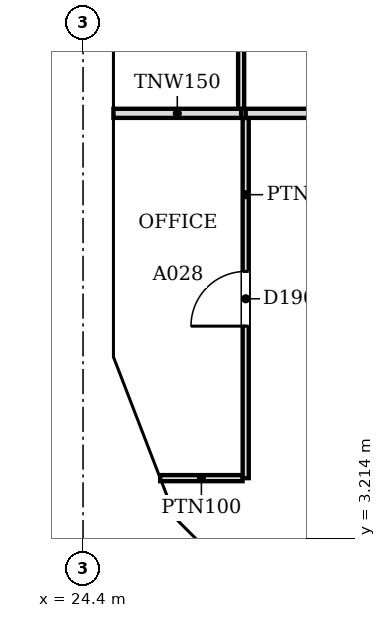
"""IFC4 building model, lengths in metres.
Left out: names, types, materials, properties, quantities, classifications, styles, units other than length and angle.
Written with IfcOpenShell. Run it as: python <this file> out.ifc"""

import sys

from ifc_helpers import new_model, si_unit, direction, frame, frame_2d, origin, place, context, subcontext, project, spatial, polyline, rectangle, outline, extrude, faceted_brep, source, transform, mapped, element, fill, save


model = new_model("IFC4")
c1 = context("Model", 3, precision=1e-05, world=origin(), true_north=direction((0.0, 1.0)))
c2 = subcontext(c1, "Body", "Model", "MODEL_VIEW")
j1 = project(units=[si_unit("LENGTHUNIT", "METRE"), si_unit("PLANEANGLEUNIT", "RADIAN")], contexts=[c1])
p1 = place(None, origin())
s1 = spatial("IfcSite", under=j1, at=p1, CompositionType="ELEMENT")
p2 = place(p1, origin())
s2 = spatial("IfcBuilding", under=s1, at=p2, CompositionType="ELEMENT")
p3 = place(p2, frame((0.0, 0.0, 33.4)))
s3 = spatial("IfcBuildingStorey", under=s2, at=p3, CompositionType="ELEMENT", Elevation=33.4)
m1 = source(origin(), c2, "Body", "Brep", [
    faceted_brep([(3.096, -0.25, 0.0), (6.1, -0.25, 3.8), (3.096, -0.25, 7.6), (0.047, -0.25, 3.857), (0.047, -0.25, 3.743), (0.0, 0.25, 3.8), (3.096, 0.25, 7.6), (6.053, 0.25, 3.859), (6.053, 0.25, 3.741), (3.096, 0.25, 0.0), (6.1, -0.0, 3.8), (0.0, 0.0, 3.8)], [[[0, 1, 2, 3, 4]], [[5, 6, 7, 8, 9]], [[9, 8, 10, 1, 0]], [[7, 6, 2, 1, 10]], [[6, 5, 11, 3, 2]], [[5, 9, 0, 4, 11]], [[11, 4, 3]], [[10, 8, 7]]]),
])
p4 = place(p3, frame((24.65, 12.247, -3.8), z_axis=(0.0, 0.0, 1.0), x_axis=(0.0, -1.0, 0.0)))
e1 = element("IfcWall", 1, at=p4, inside=s3, PredefinedType="SOLIDWALL", context=c2, shape_type="MappedRepresentation", body=[
    mapped(m1, transform((0.0, 0.0, 0.0), scale=1.0)),
])
m2 = source(origin(), c2, "Body", "SweptSolid", [
    extrude(outline(polyline([(3.094, 0.399), (5.781, 3.8), (3.094, 7.2), (0.323, 3.8), (3.094, 0.399)])), frame((0.0, 0.26, 0.0), z_axis=(0.0, -1.0, 0.0), x_axis=(1.0, 0.0, 0.0)), (0.0, 0.0, 1.0), 0.52),
])
p5 = place(p4, origin())
e2 = element("IfcOpeningElement", 2, at=p5, cuts=e1, PredefinedType="OPENING", context=c2, shape_type="MappedRepresentation", body=[
    mapped(m2, transform((0.0, 0.0, 0.0), scale=1.0)),
])
m3 = source(origin(), c2, "Body", "Brep", [
    faceted_brep([(2.95, -0.25, 0.0), (3.003, -0.25, 0.068), (3.003, -0.25, 7.531), (2.95, -0.25, 7.6), (0.0, -0.25, 3.8), (0.047, 0.25, 3.86), (2.898, 0.25, 7.532), (2.898, 0.25, 0.068), (0.047, 0.25, 3.74), (2.95, 0.0, 0.0), (2.95, 0.0, 7.6), (0.0, 0.0, 3.8)], [[[0, 1, 2, 3, 4]], [[5, 6, 7, 8]], [[1, 0, 9]], [[10, 3, 2]], [[6, 5, 11, 4, 3, 10]], [[8, 7, 9, 0, 4, 11]], [[8, 11, 5]], [[1, 9, 7, 6, 10, 2]]]),
])
p6 = place(p3, frame((24.65, 6.146, -3.8), z_axis=(0.0, 0.0, 1.0), x_axis=(0.359953949349, -0.932970071518, 0.0)))
e3 = element("IfcWall", 3, at=p6, inside=s3, PredefinedType="SOLIDWALL", context=c2, shape_type="MappedRepresentation", body=[
    mapped(m3, transform((0.0, 0.0, 0.0), scale=1.0)),
])
m4 = source(origin(), c2, "Body", "SweptSolid", [
    extrude(outline(polyline([(2.75, 6.935), (0.316, 3.8), (2.75, 0.665), (2.75, 6.935)])), frame((0.0, 0.26, 0.0), z_axis=(0.0, -1.0, 0.0), x_axis=(1.0, 0.0, 0.0)), (0.0, 0.0, 1.0), 0.52),
])
p7 = place(p6, origin())
e4 = element("IfcOpeningElement", 4, at=p7, cuts=e3, PredefinedType="OPENING", context=c2, shape_type="MappedRepresentation", body=[
    mapped(m4, transform((0.0, 0.0, 0.0), scale=1.0)),
])
m5 = source(origin(), c2, "Body", "Brep", [
    faceted_brep([(0.053, -0.25, 0.0), (2.997, -0.25, 3.8), (0.053, -0.25, 7.6), (0.0, -0.25, 7.532), (0.0, -0.25, 0.068), (0.106, 0.25, 7.531), (2.944, 0.25, 3.868), (2.944, 0.25, 3.732), (0.106, 0.25, 0.068), (2.997, 0.0, 3.8), (0.053, 0.0, 0.0), (0.053, 0.0, 7.6)], [[[0, 1, 2, 3, 4]], [[5, 6, 7, 8]], [[8, 7, 9, 1, 0, 10]], [[6, 5, 11, 2, 1, 9]], [[3, 2, 11]], [[10, 0, 4]], [[8, 10, 4, 3, 11, 5]], [[9, 7, 6]]]),
])
p8 = place(p3, frame((25.675, 3.431, -3.8), z_axis=(0.0, 0.0, 1.0), x_axis=(0.707106781187, -0.707106781187, 0.0)))
e5 = element("IfcWall", 5, at=p8, inside=s3, PredefinedType="SOLIDWALL", context=c2, shape_type="MappedRepresentation", body=[
    mapped(m5, transform((0.0, 0.0, 0.0), scale=1.0)),
])
m6 = source(origin(), c2, "Body", "SweptSolid", [
    extrude(outline(polyline([(0.253, 0.666), (2.681, 3.8), (0.253, 6.934), (0.253, 0.666)])), frame((0.0, 0.26, 0.0), z_axis=(0.0, -1.0, 0.0), x_axis=(1.0, 0.0, 0.0)), (0.0, 0.0, 1.0), 0.52),
])
p9 = place(p8, origin())
e6 = element("IfcOpeningElement", 6, at=p9, cuts=e5, PredefinedType="OPENING", context=c2, shape_type="MappedRepresentation", body=[
    mapped(m6, transform((0.0, 0.0, 0.0), scale=1.0)),
])
p10 = place(p2, frame((0.0, 0.0, 37.2)))
s4 = spatial("IfcBuildingStorey", under=s2, at=p10, CompositionType="ELEMENT", Elevation=37.2)
m7 = source(origin(), c2, "Body", "Brep", [
    faceted_brep([(0.093, -0.25, 0.057), (3.143, -0.25, 3.8), (0.093, -0.25, 7.543), (0.0, 0.25, 7.544), (0.047, 0.25, 7.6), (3.143, 0.25, 3.8), (0.047, 0.25, 0.0), (0.0, 0.25, 0.056), (0.047, 0.0, 0.0), (0.047, 0.0, 7.6)], [[[0, 1, 2]], [[3, 4, 5, 6, 7]], [[6, 5, 1, 0, 8]], [[5, 4, 9, 2, 1]], [[4, 3, 9]], [[7, 6, 8]], [[7, 8, 0, 2, 9, 3]]]),
])
p11 = place(p10, frame((24.65, 12.293, -3.8), z_axis=(0.0, 0.0, 1.0), x_axis=(0.0, -1.0, 0.0)))
e7 = element("IfcWall", 7, at=p11, inside=s4, PredefinedType="SOLIDWALL", context=c2, shape_type="MappedRepresentation", body=[
    mapped(m7, transform((0.0, 0.0, 0.0), scale=1.0)),
])
m8 = source(origin(), c2, "Body", "SweptSolid", [
    extrude(outline(polyline([(0.247, 0.641), (2.821, 3.8), (0.247, 6.959), (0.247, 0.641)])), frame((0.0, 0.26, 0.0), z_axis=(0.0, -1.0, 0.0), x_axis=(1.0, 0.0, 0.0)), (0.0, 0.0, 1.0), 0.52),
])
p12 = place(p11, origin())
e8 = element("IfcOpeningElement", 8, at=p12, cuts=e7, PredefinedType="OPENING", context=c2, shape_type="MappedRepresentation", body=[
    mapped(m8, transform((0.0, 0.0, 0.0), scale=1.0)),
])
m9 = source(origin(), c2, "Body", "Brep", [
    faceted_brep([(3.003, -0.25, 0.0), (3.05, -0.25, 0.06), (3.05, -0.25, 7.54), (3.003, -0.25, 7.6), (0.0, -0.25, 3.8), (0.0, 0.25, 3.8), (2.957, 0.25, 7.541), (2.957, 0.25, 0.059), (3.003, 0.0, 0.0), (3.003, 0.0, 7.6)], [[[0, 1, 2, 3, 4]], [[5, 6, 7]], [[1, 0, 8]], [[9, 3, 2]], [[6, 5, 4, 3, 9]], [[5, 7, 8, 0, 4]], [[1, 8, 7, 6, 9, 2]]]),
])
p13 = place(p10, frame((24.65, 9.15, -3.8), z_axis=(0.0, 0.0, 1.0), x_axis=(0.0, -1.0, 0.0)))
e9 = element("IfcWall", 9, at=p13, inside=s4, PredefinedType="SOLIDWALL", context=c2, shape_type="MappedRepresentation", body=[
    mapped(m9, transform((0.0, 0.0, 0.0), scale=1.0)),
])
m10 = source(origin(), c2, "Body", "SweptSolid", [
    extrude(outline(polyline([(2.803, 6.944), (0.319, 3.8), (2.803, 0.656), (2.803, 6.944)])), frame((0.0, 0.26, 0.0), z_axis=(0.0, -1.0, 0.0), x_axis=(1.0, 0.0, 0.0)), (0.0, 0.0, 1.0), 0.52),
])
p14 = place(p13, origin())
e10 = element("IfcOpeningElement", 10, at=p14, cuts=e9, PredefinedType="OPENING", context=c2, shape_type="MappedRepresentation", body=[
    mapped(m10, transform((0.0, 0.0, 0.0), scale=1.0)),
])
m11 = source(origin(), c2, "Body", "Brep", [
    faceted_brep([(0.047, -0.25, 0.0), (2.997, -0.25, 3.8), (0.047, -0.25, 7.6), (0.0, -0.25, 7.541), (0.0, -0.25, 0.059), (0.093, 0.25, 7.54), (2.944, 0.25, 3.868), (2.944, 0.25, 3.732), (0.093, 0.25, 0.06), (2.997, 0.0, 3.8), (0.047, 0.0, 0.0), (0.047, 0.0, 7.6)], [[[0, 1, 2, 3, 4]], [[5, 6, 7, 8]], [[8, 7, 9, 1, 0, 10]], [[6, 5, 11, 2, 1, 9]], [[3, 2, 11]], [[10, 0, 4]], [[8, 10, 4, 3, 11, 5]], [[9, 7, 6]]]),
])
p15 = place(p10, frame((24.633, 6.19, -3.8), z_axis=(0.0, 0.0, 1.0), x_axis=(0.359901446078, -0.932990326376, 0.0)))
e11 = element("IfcWall", 11, at=p15, inside=s4, PredefinedType="SOLIDWALL", context=c2, shape_type="MappedRepresentation", body=[
    mapped(m11, transform((0.0, 0.0, 0.0), scale=1.0)),
])
m12 = source(origin(), c2, "Body", "SweptSolid", [
    extrude(outline(polyline([(0.247, 0.665), (2.681, 3.8), (0.247, 6.935), (0.247, 0.665)])), frame((0.0, 0.26, 0.0), z_axis=(0.0, -1.0, 0.0), x_axis=(1.0, 0.0, 0.0)), (0.0, 0.0, 1.0), 0.52),
])
p16 = place(p15, origin())
e12 = element("IfcOpeningElement", 12, at=p16, cuts=e11, PredefinedType="OPENING", context=c2, shape_type="MappedRepresentation", body=[
    mapped(m12, transform((0.0, 0.0, 0.0), scale=1.0)),
])
m13 = source(origin(), c2, "Body", "Brep", [
    faceted_brep([(2.944, -0.25, 0.0), (2.997, -0.25, 0.068), (2.997, -0.25, 7.532), (2.944, -0.25, 7.6), (0.0, -0.25, 3.8), (0.053, 0.25, 3.868), (2.891, 0.25, 7.532), (2.891, 0.25, 0.068), (0.053, 0.25, 3.732), (2.944, 0.0, 0.0), (2.944, 0.0, 7.6), (0.0, 0.0, 3.8)], [[[0, 1, 2, 3, 4]], [[5, 6, 7, 8]], [[1, 0, 9]], [[10, 3, 2]], [[6, 5, 11, 4, 3, 10]], [[8, 7, 9, 0, 4, 11]], [[8, 11, 5]], [[1, 9, 7, 6, 10, 2]]]),
])
p17 = place(p10, frame((25.712, 3.394, -3.8), z_axis=(0.0, 0.0, 1.0), x_axis=(0.707066050402, -0.707147509625, 0.0)))
e13 = element("IfcWall", 13, at=p17, inside=s4, PredefinedType="SOLIDWALL", context=c2, shape_type="MappedRepresentation", body=[
    mapped(m13, transform((0.0, 0.0, 0.0), scale=1.0)),
])
m14 = source(origin(), c2, "Body", "SweptSolid", [
    extrude(outline(polyline([(2.744, 6.934), (0.316, 3.8), (2.744, 0.667), (2.744, 6.934)])), frame((0.0, 0.26, 0.0), z_axis=(0.0, -1.0, 0.0), x_axis=(1.0, 0.0, 0.0)), (0.0, 0.0, 1.0), 0.52),
])
p18 = place(p17, origin())
e14 = element("IfcOpeningElement", 14, at=p18, cuts=e13, PredefinedType="OPENING", context=c2, shape_type="MappedRepresentation", body=[
    mapped(m14, transform((0.0, 0.0, 0.0), scale=1.0)),
])
p19 = place(p3, frame((25.669, 4.2, 0.0), z_axis=(0.0, 0.0, 1.0), x_axis=(1.0, 0.0, 0.0)))
e15 = element("IfcWall", 15, at=p19, inside=s3, PredefinedType="PARTITIONING", context=c2, shape_type="SweptSolid", body=[
    extrude(rectangle(XDim=1.355, YDim=0.1, at=frame_2d((0.678, 0.0))), origin(), (0.0, 0.0, 1.0), 3.067),
])
p20 = place(p3, frame((27.075, 4.2, 0.0), z_axis=(0.0, 0.0, 1.0), x_axis=(0.0, 1.0, 0.0)))
e16 = element("IfcWall", 16, at=p20, inside=s3, PredefinedType="PARTITIONING", context=c2, shape_type="SweptSolid", body=[
    extrude(rectangle(XDim=5.924, YDim=0.1, at=frame_2d((2.962, 0.0))), origin(), (0.0, 0.0, 1.0), 3.067),
])
m15 = source(origin(), c2, "Body", "SweptSolid", [
    extrude(rectangle(XDim=0.9, YDim=2.1, at=frame_2d((0.45, 1.05))), frame((0.0, 0.06, 0.0), z_axis=(0.0, -1.0, 0.0), x_axis=(1.0, 0.0, 0.0)), (0.0, 0.0, 1.0), 0.12),
])
p21 = place(p20, frame((2.5, 0.0, 0.0)))
e17 = element("IfcOpeningElement", 17, at=p21, cuts=e16, PredefinedType="OPENING", context=c2, shape_type="MappedRepresentation", body=[
    mapped(m15, transform((0.0, 0.0, 0.0), scale=1.0)),
])
p22 = place(p3, frame((24.9, 10.2, 0.0), z_axis=(0.0, 0.0, 1.0), x_axis=(1.0, 0.0, 0.0)))
e18 = element("IfcWall", 18, at=p22, inside=s3, PredefinedType="PARTITIONING", context=c2, shape_type="SweptSolid", body=[
    extrude(rectangle(XDim=2.1, YDim=0.15, at=frame_2d((1.05, 0.0))), origin(), (0.0, 0.0, 1.0), 3.067),
])
p23 = place(p3, frame((27.075, 10.2, 0.0), z_axis=(0.0, 0.0, 1.0), x_axis=(1.0, 0.0, 0.0)))
e19 = element("IfcWall", 19, at=p23, inside=s3, PredefinedType="PARTITIONING", context=c2, shape_type="SweptSolid", body=[
    extrude(rectangle(XDim=15.849, YDim=0.15, at=frame_2d((7.925, 0.0))), origin(), (0.0, 0.0, 1.0), 3.067),
])
p24 = place(p3, frame((27.0, 10.276, 0.0), z_axis=(0.0, 0.0, 1.0), x_axis=(0.0, 1.0, 0.0)))
e20 = element("IfcWall", 20, at=p24, inside=s3, PredefinedType="PARTITIONING", context=c2, shape_type="SweptSolid", body=[
    extrude(rectangle(XDim=8.448, YDim=0.1, at=frame_2d((4.224, 0.0))), origin(), (0.0, 0.0, 1.0), 3.067),
])
p25 = place(p24, frame((1.6, 0.0, 0.0)))
e21 = element("IfcOpeningElement", 21, at=p25, cuts=e20, PredefinedType="OPENING", context=c2, shape_type="MappedRepresentation", body=[
    mapped(m15, transform((0.0, 0.0, 0.0), scale=1.0)),
])
p26 = place(p24, frame((5.779, 0.0, 0.0)))
e22 = element("IfcOpeningElement", 22, at=p26, cuts=e20, PredefinedType="OPENING", context=c2, shape_type="MappedRepresentation", body=[
    mapped(m15, transform((0.0, 0.0, 0.0), scale=1.0)),
])
m16 = source(origin(), c2, "Body", "SweptSolid", [
    extrude(rectangle(XDim=0.9, YDim=2.1, at=frame_2d((0.45, 1.05))), frame((0.0, 0.025, 0.0), z_axis=(0.0, -1.0, 0.0), x_axis=(1.0, 0.0, 0.0)), (0.0, 0.0, 1.0), 0.05),
])
p27 = place(p21, origin())
e23 = element("IfcDoor", 23, at=p27, inside=s3, OperationType="SINGLE_SWING_LEFT", PredefinedType="DOOR", context=c2, shape_type="MappedRepresentation", body=[
    mapped(m16, transform((0.0, 0.0, 0.0), scale=1.0)),
])
fill(e17, e23)
save(model, sys.argv[1])
